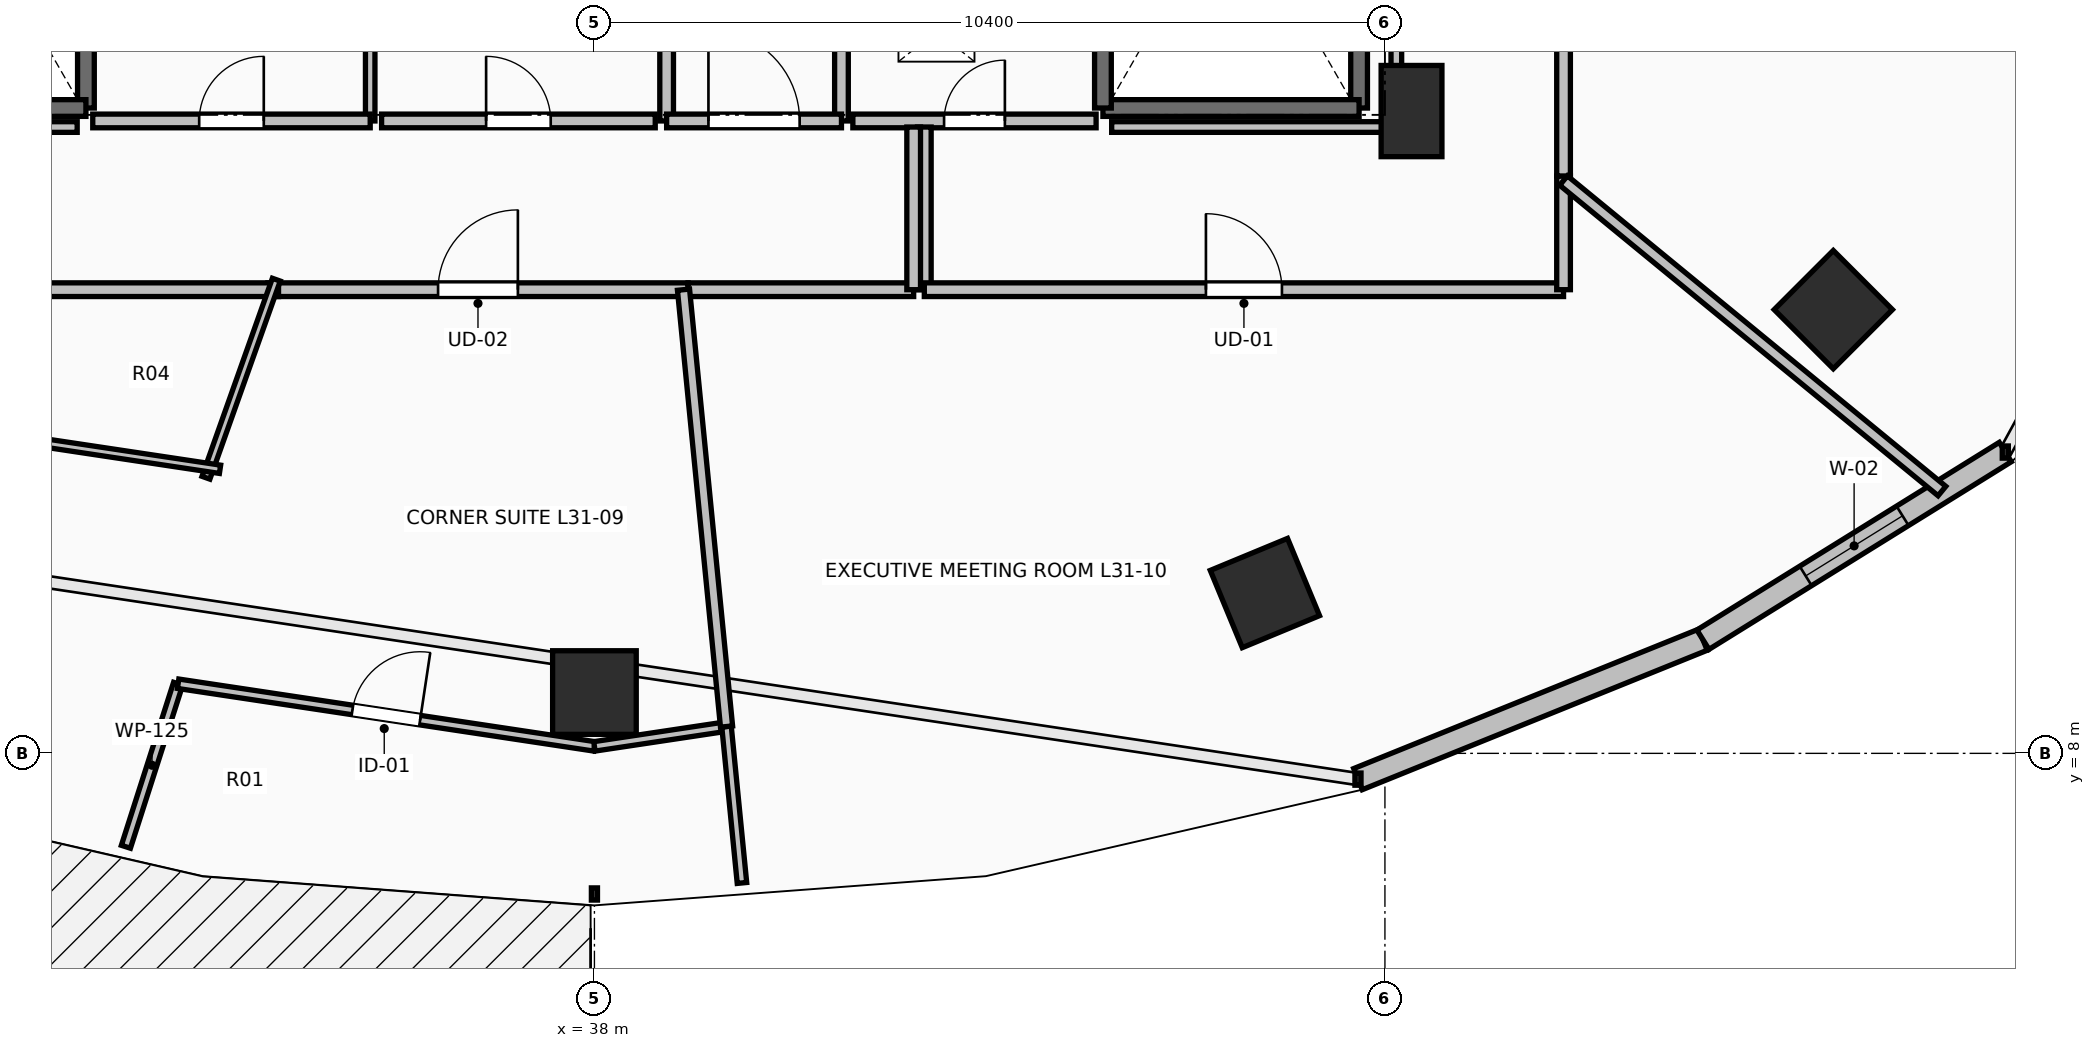
"""IFC4 building model, lengths in metres.
Left out: names, types, materials, properties, quantities, classifications, styles, units other than length and angle.
Written with IfcOpenShell. Run it as: python <this file> out.ifc"""

import sys

from ifc_helpers import new_model, si_unit, direction, frame, frame_2d, origin, origin_2d, place, context, subcontext, project, spatial, rectangle, extrude, element, fill, save


model = new_model("IFC4")
c1 = context("Model", 3, precision=1e-05, world=origin(), true_north=direction((0.0, 1.0)))
c2 = subcontext(c1, "Body", "Model", "MODEL_VIEW")
j1 = project(units=[si_unit("LENGTHUNIT", "METRE"), si_unit("PLANEANGLEUNIT", "RADIAN")], contexts=[c1])
p1 = place(None, origin())
s1 = spatial("IfcSite", under=j1, at=p1, CompositionType="ELEMENT")
p2 = place(p1, origin())
s2 = spatial("IfcBuilding", under=s1, at=p2, CompositionType="ELEMENT")
p3 = place(p2, frame((0.0, 0.0, 117.3)))
s3 = spatial("IfcBuildingStorey", under=s2, at=p3, CompositionType="ELEMENT", Elevation=117.3)
for number, where, z_axis, x_axis in (
    (1, (38.0, 8.8, 0.0), (0.0, 0.0, 1.0), (0.0, -1.0, 0.0)),
    (2, (46.821, 10.109, 0.0), (0.0, 0.0, 1.0), (0.383, -0.924, 0.0)),
    (3, (54.299, 13.838, 0.0), (0.0, 0.0, 1.0), (0.707, -0.707, 0.0)),
):
    element("IfcColumn", number, at=place(p3, frame(where, z_axis=z_axis, x_axis=x_axis)), inside=s3, PredefinedType="COLUMN", context=c2, shape_type="SweptSolid", body=[
        extrude(rectangle(XDim=1.1, YDim=1.1, at=origin_2d()), origin(), (0.0, 0.0, 1.0), 3.5),
    ])
p4 = place(p3, frame((48.75, 16.45, 0.0), z_axis=(0.0, 0.0, 1.0), x_axis=(1.0, 0.0, 0.0)))
e4 = element("IfcColumn", 4, at=p4, inside=s3, PredefinedType="PILASTER", context=c2, shape_type="SweptSolid", body=[
    extrude(rectangle(XDim=0.8, YDim=1.2, at=origin_2d()), origin(), (0.0, 0.0, 1.0), 3.5),
])
p5 = place(p3, frame((48.045, 7.661, 0.0), z_axis=(0.0, 0.0, 1.0), x_axis=(0.927122233109, 0.374759075775, 0.0)))
e5 = element("IfcWall", 5, at=p5, inside=s3, PredefinedType="STANDARD", context=c2, shape_type="SweptSolid", body=[
    extrude(rectangle(XDim=4.895, YDim=0.3, at=frame_2d((2.448, 0.0))), origin(), (0.0, 0.0, 1.0), 3.24),
])
p6 = place(p3, frame((52.584, 9.495, 0.0), z_axis=(0.0, 0.0, 1.0), x_axis=(0.849684479743, 0.527291461038, 0.0)))
e6 = element("IfcWall", 6, at=p6, inside=s3, PredefinedType="STANDARD", context=c2, shape_type="SweptSolid", body=[
    extrude(rectangle(XDim=4.681, YDim=0.3, at=frame_2d((2.341, 0.0))), origin(), (0.0, 0.0, 1.0), 3.24),
])
p7 = place(p6, frame((1.591, 0.0, 0.85)))
e7 = element("IfcOpeningElement", 7, at=p7, cuts=e6, PredefinedType="OPENING", context=c2, shape_type="SweptSolid", body=[
    extrude(rectangle(XDim=1.5, YDim=2.19, at=frame_2d((0.75, 1.095))), frame((0.0, 0.165, 0.0), z_axis=(0.0, -1.0, 0.0), x_axis=(1.0, 0.0, 0.0)), (0.0, 0.0, 1.0), 0.33),
])
p8 = place(p3, frame((31.31, 23.91, 0.0), z_axis=(0.0, 0.0, 1.0), x_axis=(0.0, -1.0, 0.0)))
e8 = element("IfcWall", 8, at=p8, inside=s3, PredefinedType="SOLIDWALL", context=c2, shape_type="SweptSolid", body=[
    extrude(rectangle(XDim=7.42, YDim=0.22, at=frame_2d((3.71, 0.0))), origin(), (0.0, 0.0, 1.0), 3.24),
])
p9 = place(p3, frame((31.31, 16.49, 0.0), z_axis=(0.0, 0.0, 1.0), x_axis=(-1.0, 0.0, 0.0)))
e9 = element("IfcWall", 9, at=p9, inside=s3, PredefinedType="SOLIDWALL", context=c2, shape_type="SweptSolid", body=[
    extrude(rectangle(XDim=3.37, YDim=0.22, at=frame_2d((1.685, 0.0))), origin(), (0.0, 0.0, 1.0), 3.24),
])
p10 = place(p3, frame((48.06, 23.91, 0.0), z_axis=(0.0, 0.0, 1.0), x_axis=(0.0, -1.0, 0.0)))
e10 = element("IfcWall", 10, at=p10, inside=s3, PredefinedType="SOLIDWALL", context=c2, shape_type="SweptSolid", body=[
    extrude(rectangle(XDim=7.42, YDim=0.22, at=frame_2d((3.71, 0.0))), origin(), (0.0, 0.0, 1.0), 3.24),
])
p11 = place(p3, frame((48.06, 16.49, 0.0), z_axis=(0.0, 0.0, 1.0), x_axis=(-1.0, 0.0, 0.0)))
e11 = element("IfcWall", 11, at=p11, inside=s3, PredefinedType="SOLIDWALL", context=c2, shape_type="SweptSolid", body=[
    extrude(rectangle(XDim=3.37, YDim=0.22, at=frame_2d((1.685, 0.0))), origin(), (0.0, 0.0, 1.0), 3.24),
])
p12 = place(p3, frame((44.69, 16.49, 0.0), z_axis=(0.0, 0.0, 1.0), x_axis=(0.0, 1.0, 0.0)))
e12 = element("IfcWall", 12, at=p12, inside=s3, PredefinedType="SOLIDWALL", context=c2, shape_type="SweptSolid", body=[
    extrude(rectangle(XDim=7.42, YDim=0.22, at=frame_2d((3.71, 0.0))), origin(), (0.0, 0.0, 1.0), 3.24),
])
p13 = place(p3, frame((41.25, 16.32, 0.0), z_axis=(0.0, 0.0, 1.0), x_axis=(0.0, 1.0, 0.0)))
e13 = element("IfcWall", 13, at=p13, inside=s3, PredefinedType="PARTITIONING", context=c2, shape_type="SweptSolid", body=[
    extrude(rectangle(XDim=7.88, YDim=0.18, at=frame_2d((3.94, 0.0))), origin(), (0.0, 0.0, 1.0), 3.24),
])
p14 = place(p13, frame((3.54, 0.0, 0.0)))
e14 = element("IfcOpeningElement", 14, at=p14, cuts=e13, PredefinedType="OPENING", context=c2, shape_type="SweptSolid", body=[
    extrude(rectangle(XDim=0.8, YDim=2.05, at=frame_2d((0.4, 1.025))), frame((0.0, 0.105, 0.0), z_axis=(0.0, -1.0, 0.0), x_axis=(1.0, 0.0, 0.0)), (0.0, 0.0, 1.0), 0.21),
])
p15 = place(p3, frame((38.95, 21.755, 0.0), z_axis=(0.0, 0.0, 1.0), x_axis=(0.0, -1.0, 0.0)))
e15 = element("IfcWall", 15, at=p15, inside=s3, PredefinedType="PARTITIONING", context=c2, shape_type="SweptSolid", body=[
    extrude(rectangle(XDim=5.435, YDim=0.18, at=frame_2d((2.717, 0.0))), origin(), (0.0, 0.0, 1.0), 3.24),
])
p16 = place(p15, frame((2.292, 0.0, 0.0)))
e16 = element("IfcOpeningElement", 16, at=p16, cuts=e15, PredefinedType="OPENING", context=c2, shape_type="SweptSolid", body=[
    extrude(rectangle(XDim=0.85, YDim=2.1, at=frame_2d((0.425, 1.05))), frame((0.0, 0.105, 0.0), z_axis=(0.0, -1.0, 0.0), x_axis=(1.0, 0.0, 0.0)), (0.0, 0.0, 1.0), 0.21),
])
p17 = place(p3, frame((38.95, 16.32, 0.0), z_axis=(0.0, 0.0, 1.0), x_axis=(1.0, 0.0, 0.0)))
e17 = element("IfcWall", 17, at=p17, inside=s3, PredefinedType="PARTITIONING", context=c2, shape_type="SweptSolid", body=[
    extrude(rectangle(XDim=2.3, YDim=0.18, at=frame_2d((1.15, 0.0))), origin(), (0.0, 0.0, 1.0), 3.24),
])
p18 = place(p17, frame((0.55, 0.0, 0.0)))
e18 = element("IfcOpeningElement", 18, at=p18, cuts=e17, PredefinedType="OPENING", context=c2, shape_type="SweptSolid", body=[
    extrude(rectangle(XDim=1.2, YDim=2.15, at=frame_2d((0.6, 1.075))), frame((0.0, 0.105, 0.0), z_axis=(0.0, -1.0, 0.0), x_axis=(1.0, 0.0, 0.0)), (0.0, 0.0, 1.0), 0.21),
])
p19 = place(p3, frame((41.4, 16.32, 0.0), z_axis=(0.0, 0.0, 1.0), x_axis=(1.0, 0.0, 0.0)))
e19 = element("IfcWall", 19, at=p19, inside=s3, PredefinedType="PARTITIONING", context=c2, shape_type="SweptSolid", body=[
    extrude(rectangle(XDim=3.2, YDim=0.18, at=frame_2d((1.6, 0.0))), origin(), (0.0, 0.0, 1.0), 3.24),
])
p20 = place(p19, frame((1.2, 0.0, 0.0)))
e20 = element("IfcOpeningElement", 20, at=p20, cuts=e19, PredefinedType="OPENING", context=c2, shape_type="SweptSolid", body=[
    extrude(rectangle(XDim=0.8, YDim=2.05, at=frame_2d((0.4, 1.025))), frame((0.0, 0.105, 0.0), z_axis=(0.0, -1.0, 0.0), x_axis=(1.0, 0.0, 0.0)), (0.0, 0.0, 1.0), 0.21),
])
p21 = place(p3, frame((35.05, 16.32, 0.0), z_axis=(0.0, 0.0, 1.0), x_axis=(0.0, 1.0, 0.0)))
e21 = element("IfcWall", 21, at=p21, inside=s3, PredefinedType="PARTITIONING", context=c2, shape_type="SweptSolid", body=[
    extrude(rectangle(XDim=5.13, YDim=0.125, at=frame_2d((2.565, 0.0))), origin(), (0.0, 0.0, 1.0), 3.24),
])
p22 = place(p3, frame((31.4, 16.32, 0.0), z_axis=(0.0, 0.0, 1.0), x_axis=(1.0, 0.0, 0.0)))
e22 = element("IfcWall", 22, at=p22, inside=s3, PredefinedType="PARTITIONING", context=c2, shape_type="SweptSolid", body=[
    extrude(rectangle(XDim=3.65, YDim=0.18, at=frame_2d((1.825, 0.0))), origin(), (0.0, 0.0, 1.0), 3.24),
])
p23 = place(p22, frame((1.4, 0.0, 0.0)))
e23 = element("IfcOpeningElement", 23, at=p23, cuts=e22, PredefinedType="OPENING", context=c2, shape_type="SweptSolid", body=[
    extrude(rectangle(XDim=0.85, YDim=2.1, at=frame_2d((0.425, 1.05))), frame((0.0, 0.105, 0.0), z_axis=(0.0, -1.0, 0.0), x_axis=(1.0, 0.0, 0.0)), (0.0, 0.0, 1.0), 0.21),
])
p24 = place(p3, frame((35.2, 16.32, 0.0), z_axis=(0.0, 0.0, 1.0), x_axis=(1.0, 0.0, 0.0)))
e24 = element("IfcWall", 24, at=p24, inside=s3, PredefinedType="PARTITIONING", context=c2, shape_type="SweptSolid", body=[
    extrude(rectangle(XDim=3.6, YDim=0.18, at=frame_2d((1.8, 0.0))), origin(), (0.0, 0.0, 1.0), 3.24),
])
p25 = place(p24, frame((1.375, 0.0, 0.0)))
e25 = element("IfcOpeningElement", 25, at=p25, cuts=e24, PredefinedType="OPENING", context=c2, shape_type="SweptSolid", body=[
    extrude(rectangle(XDim=0.85, YDim=2.1, at=frame_2d((0.425, 1.05))), frame((0.0, 0.105, 0.0), z_axis=(0.0, -1.0, 0.0), x_axis=(1.0, 0.0, 0.0)), (0.0, 0.0, 1.0), 0.21),
])
p26 = place(p3, frame((33.704, 14.1, 0.0), z_axis=(0.0, 0.0, 1.0), x_axis=(1.0, 0.0, 0.0)))
e26 = element("IfcWall", 26, at=p26, inside=s3, PredefinedType="PARTITIONING", context=c2, shape_type="SweptSolid", body=[
    extrude(rectangle(XDim=5.528, YDim=0.18, at=frame_2d((2.764, 0.0))), origin(), (0.0, 0.0, 1.0), 2.874),
])
p27 = place(p26, frame((2.239, 0.0, 0.0)))
e27 = element("IfcOpeningElement", 27, at=p27, cuts=e26, PredefinedType="OPENING", context=c2, shape_type="SweptSolid", body=[
    extrude(rectangle(XDim=1.05, YDim=2.2, at=frame_2d((0.525, 1.1))), frame((0.0, 0.105, 0.0), z_axis=(0.0, -1.0, 0.0), x_axis=(1.0, 0.0, 0.0)), (0.0, 0.0, 1.0), 0.21),
])
p28 = place(p3, frame((28.154, 14.1, 0.0), z_axis=(0.0, 0.0, 1.0), x_axis=(1.0, 0.0, 0.0)))
e28 = element("IfcWall", 28, at=p28, inside=s3, PredefinedType="PARTITIONING", context=c2, shape_type="SweptSolid", body=[
    extrude(rectangle(XDim=5.69, YDim=0.18, at=frame_2d((2.845, 0.0))), origin(), (0.0, 0.0, 1.0), 2.432),
])
p29 = place(p3, frame((42.34, 16.24, 0.0), z_axis=(0.0, 0.0, 1.0), x_axis=(0.0, -1.0, 0.0)))
e29 = element("IfcWall", 29, at=p29, inside=s3, PredefinedType="PARTITIONING", context=c2, shape_type="SweptSolid", body=[
    extrude(rectangle(XDim=2.14, YDim=0.18, at=frame_2d((1.07, 0.0))), origin(), (0.0, 0.0, 1.0), 2.874),
])
p30 = place(p3, frame((42.34, 14.1, 0.0), z_axis=(0.0, 0.0, 1.0), x_axis=(1.0, 0.0, 0.0)))
e30 = element("IfcWall", 30, at=p30, inside=s3, PredefinedType="PARTITIONING", context=c2, shape_type="SweptSolid", body=[
    extrude(rectangle(XDim=8.41, YDim=0.18, at=frame_2d((4.205, 0.0))), origin(), (0.0, 0.0, 1.0), 2.432),
])
p31 = place(p30, frame((3.705, 0.0, 0.0)))
e31 = element("IfcOpeningElement", 31, at=p31, cuts=e30, PredefinedType="OPENING", context=c2, shape_type="SweptSolid", body=[
    extrude(rectangle(XDim=1.0, YDim=2.15, at=frame_2d((0.5, 1.075))), frame((0.0, 0.105, 0.0), z_axis=(0.0, -1.0, 0.0), x_axis=(1.0, 0.0, 0.0)), (0.0, 0.0, 1.0), 0.21),
])
p32 = place(p3, frame((50.75, 14.1, 0.0), z_axis=(0.0, 0.0, 1.0), x_axis=(0.0, 1.0, 0.0)))
e32 = element("IfcWall", 32, at=p32, inside=s3, PredefinedType="PARTITIONING", context=c2, shape_type="SweptSolid", body=[
    extrude(rectangle(XDim=1.496, YDim=0.18, at=frame_2d((0.748, 0.0))), origin(), (0.0, 0.0, 1.0), 2.432),
])
p33 = place(p3, frame((39.232, 14.1, 0.0), z_axis=(0.0, 0.0, 1.0), x_axis=(1.0, 0.0, 0.0)))
e33 = element("IfcWall", 33, at=p33, inside=s3, PredefinedType="PARTITIONING", context=c2, shape_type="SweptSolid", body=[
    extrude(rectangle(XDim=2.968, YDim=0.18, at=frame_2d((1.484, 0.0))), origin(), (0.0, 0.0, 1.0), 2.874),
])
p34 = place(p3, frame((42.2, 14.1, 0.0), z_axis=(0.0, 0.0, 1.0), x_axis=(0.0, 1.0, 0.0)))
e34 = element("IfcWall", 34, at=p34, inside=s3, PredefinedType="PARTITIONING", context=c2, shape_type="SweptSolid", body=[
    extrude(rectangle(XDim=2.14, YDim=0.18, at=frame_2d((1.07, 0.0))), origin(), (0.0, 0.0, 1.0), 2.874),
])
p35 = place(p3, frame((50.75, 15.596, 0.0), z_axis=(0.0, 0.0, 1.0), x_axis=(0.0, 1.0, 0.0)))
e35 = element("IfcWall", 35, at=p35, inside=s3, PredefinedType="PARTITIONING", context=c2, shape_type="SweptSolid", body=[
    extrude(rectangle(XDim=11.46, YDim=0.18, at=frame_2d((5.73, 0.0))), origin(), (0.0, 0.0, 1.0), 2.432),
])
p36 = place(p35, frame((5.23, 0.0, 0.0)))
e36 = element("IfcOpeningElement", 36, at=p36, cuts=e35, PredefinedType="OPENING", context=c2, shape_type="SweptSolid", body=[
    extrude(rectangle(XDim=1.0, YDim=2.15, at=frame_2d((0.5, 1.075))), frame((0.0, 0.105, 0.0), z_axis=(0.0, -1.0, 0.0), x_axis=(1.0, 0.0, 0.0)), (0.0, 0.0, 1.0), 0.21),
])
p37 = place(p3, frame((33.815, 14.232, 0.0), z_axis=(0.0, 0.0, 1.0), x_axis=(-0.334786713612, -0.942293933117, 0.0)))
e37 = element("IfcWall", 37, at=p37, inside=s3, PredefinedType="PARTITIONING", context=c2, shape_type="SweptSolid", body=[
    extrude(rectangle(XDim=2.765, YDim=0.11, at=frame_2d((1.383, 0.0))), origin(), (0.0, 0.0, 1.0), 2.874),
])
p38 = place(p3, frame((33.074, 11.737, 0.0), z_axis=(0.0, 0.0, 1.0), x_axis=(-0.988902866222, 0.148563525729, 0.0)))
e38 = element("IfcWall", 38, at=p38, inside=s3, PredefinedType="PARTITIONING", context=c2, shape_type="SweptSolid", body=[
    extrude(rectangle(XDim=2.836, YDim=0.11, at=frame_2d((1.418, 0.0))), origin(), (0.0, 0.0, 1.0), 3.24),
])
p39 = place(p3, frame((31.836, 6.771, 0.0), z_axis=(0.0, 0.0, 1.0), x_axis=(0.305019563363, 0.952346085184, 0.0)))
e39 = element("IfcWall", 39, at=p39, inside=s3, PredefinedType="PARTITIONING", context=c2, shape_type="SweptSolid", body=[
    extrude(rectangle(XDim=2.252, YDim=0.125, at=frame_2d((1.126, 0.0))), origin(), (0.0, 0.0, 1.0), 3.24),
])
p40 = place(p3, frame((32.523, 8.916, 0.0), z_axis=(0.0, 0.0, 1.0), x_axis=(0.988872243588, -0.148767220385, 0.0)))
e40 = element("IfcWall", 40, at=p40, inside=s3, PredefinedType="PARTITIONING", context=c2, shape_type="SweptSolid", body=[
    extrude(rectangle(XDim=5.539, YDim=0.125, at=frame_2d((2.769, 0.0))), origin(), (0.0, 0.0, 1.0), 3.24),
])
p41 = place(p40, frame((2.319, 0.0, 0.0)))
e41 = element("IfcOpeningElement", 41, at=p41, cuts=e40, PredefinedType="OPENING", context=c2, shape_type="SweptSolid", body=[
    extrude(rectangle(XDim=0.9, YDim=2.1, at=frame_2d((0.45, 1.05))), frame((0.0, 0.077, 0.0), z_axis=(0.0, -1.0, 0.0), x_axis=(1.0, 0.0, 0.0)), (0.0, 0.0, 1.0), 0.155),
])
p42 = place(p3, frame((38.0, 8.092, 0.0), z_axis=(0.0, 0.0, 1.0), x_axis=(0.988912905534, 0.148496684368, 0.0)))
e42 = element("IfcWall", 42, at=p42, inside=s3, PredefinedType="PARTITIONING", context=c2, shape_type="SweptSolid", body=[
    extrude(rectangle(XDim=1.758, YDim=0.125, at=frame_2d((0.879, 0.0))), origin(), (0.0, 0.0, 1.0), 3.24),
])
p43 = place(p3, frame((39.738, 8.353, 0.0), z_axis=(0.0, 0.0, 1.0), x_axis=(0.098101024823, -0.995176461201, 0.0)))
e43 = element("IfcWall", 43, at=p43, inside=s3, PredefinedType="PARTITIONING", context=c2, shape_type="SweptSolid", body=[
    extrude(rectangle(XDim=2.068, YDim=0.125, at=frame_2d((1.034, 0.0))), origin(), (0.0, 0.0, 1.0), 3.24),
])
p44 = place(p3, frame((39.738, 8.353, 0.0), z_axis=(0.0, 0.0, 1.0), x_axis=(-0.098038593066, 0.995182613529, 0.0)))
e44 = element("IfcWall", 44, at=p44, inside=s3, PredefinedType="PARTITIONING", context=c2, shape_type="SweptSolid", body=[
    extrude(rectangle(XDim=5.775, YDim=0.16, at=frame_2d((2.887, 0.0))), origin(), (0.0, 0.0, 1.0), 2.432),
])
p45 = place(p3, frame((55.728, 11.451, 0.0), z_axis=(0.0, 0.0, 1.0), x_axis=(-0.7730409537, 0.634356117573, 0.0)))
e45 = element("IfcWall", 45, at=p45, inside=s3, PredefinedType="PARTITIONING", context=c2, shape_type="SweptSolid", body=[
    extrude(rectangle(XDim=6.439, YDim=0.16, at=frame_2d((3.22, 0.0))), origin(), (0.0, 0.0, 1.0), 2.432),
])
p46 = place(p3, frame((48.55, 23.754, 0.0), z_axis=(0.0, 0.0, 1.0), x_axis=(0.0, -1.0, 0.0)))
e46 = element("IfcWall", 46, at=p46, inside=s3, PredefinedType="PARTITIONING", context=c2, shape_type="SweptSolid", body=[
    extrude(rectangle(XDim=7.514, YDim=0.14, at=frame_2d((3.757, 0.0))), origin(), (0.0, 0.0, 1.0), 2.432),
])
for number, where, z_axis, x_axis in (
    (47, (48.55, 16.24, 0.0), (0.0, 0.0, 1.0), (-1.0, 0.0, 0.0)),
    (48, (31.195, 16.24, 0.0), (0.0, 0.0, 1.0), (-1.0, 0.0, 0.0)),
):
    element("IfcWall", number, at=place(p3, frame(where, z_axis=z_axis, x_axis=x_axis)), inside=s3, PredefinedType="PARTITIONING", context=c2, shape_type="SweptSolid", body=[
        extrude(rectangle(XDim=3.745, YDim=0.14, at=frame_2d((1.873, 0.0))), origin(), (0.0, 0.0, 1.0), 2.432),
    ])
p47 = place(p7, origin())
e49 = element("IfcWindow", 49, at=p47, inside=s3, PartitioningType="SINGLE_PANEL", PredefinedType="WINDOW", context=c2, shape_type="SweptSolid", body=[
    extrude(rectangle(XDim=1.5, YDim=2.19, at=frame_2d((0.75, 1.095))), frame((0.0, 0.03, 0.0), z_axis=(0.0, -1.0, 0.0), x_axis=(1.0, 0.0, 0.0)), (0.0, 0.0, 1.0), 0.06),
])
fill(e7, e49)
p48 = place(p18, origin())
e50 = element("IfcDoor", 50, at=p48, inside=s3, OperationType="SINGLE_SWING_LEFT", PredefinedType="DOOR", context=c2, shape_type="SweptSolid", body=[
    extrude(rectangle(XDim=1.2, YDim=2.15, at=frame_2d((0.6, 1.075))), frame((0.0, 0.025, 0.0), z_axis=(0.0, -1.0, 0.0), x_axis=(1.0, 0.0, 0.0)), (0.0, 0.0, 1.0), 0.05),
])
fill(e18, e50)
p49 = place(p20, origin())
e51 = element("IfcDoor", 51, at=p49, inside=s3, OperationType="SINGLE_SWING_RIGHT", PredefinedType="DOOR", context=c2, shape_type="SweptSolid", body=[
    extrude(rectangle(XDim=0.8, YDim=2.05, at=frame_2d((0.4, 1.025))), frame((0.0, 0.025, 0.0), z_axis=(0.0, -1.0, 0.0), x_axis=(1.0, 0.0, 0.0)), (0.0, 0.0, 1.0), 0.05),
])
fill(e20, e51)
p50 = place(p23, origin())
e52 = element("IfcDoor", 52, at=p50, inside=s3, OperationType="SINGLE_SWING_RIGHT", PredefinedType="DOOR", context=c2, shape_type="SweptSolid", body=[
    extrude(rectangle(XDim=0.85, YDim=2.1, at=frame_2d((0.425, 1.05))), frame((0.0, 0.025, 0.0), z_axis=(0.0, -1.0, 0.0), x_axis=(1.0, 0.0, 0.0)), (0.0, 0.0, 1.0), 0.05),
])
fill(e23, e52)
p51 = place(p25, origin())
e53 = element("IfcDoor", 53, at=p51, inside=s3, OperationType="SINGLE_SWING_LEFT", PredefinedType="DOOR", context=c2, shape_type="SweptSolid", body=[
    extrude(rectangle(XDim=0.85, YDim=2.1, at=frame_2d((0.425, 1.05))), frame((0.0, 0.025, 0.0), z_axis=(0.0, -1.0, 0.0), x_axis=(1.0, 0.0, 0.0)), (0.0, 0.0, 1.0), 0.05),
])
fill(e25, e53)
p52 = place(p27, origin())
e54 = element("IfcDoor", 54, at=p52, inside=s3, OperationType="SINGLE_SWING_RIGHT", PredefinedType="DOOR", context=c2, shape_type="SweptSolid", body=[
    extrude(rectangle(XDim=1.05, YDim=2.2, at=frame_2d((0.525, 1.1))), frame((0.0, 0.025, 0.0), z_axis=(0.0, -1.0, 0.0), x_axis=(1.0, 0.0, 0.0)), (0.0, 0.0, 1.0), 0.05),
])
fill(e27, e54)
p53 = place(p31, origin())
e55 = element("IfcDoor", 55, at=p53, inside=s3, OperationType="SINGLE_SWING_LEFT", PredefinedType="DOOR", context=c2, shape_type="SweptSolid", body=[
    extrude(rectangle(XDim=1.0, YDim=2.15, at=frame_2d((0.5, 1.075))), frame((0.0, 0.025, 0.0), z_axis=(0.0, -1.0, 0.0), x_axis=(1.0, 0.0, 0.0)), (0.0, 0.0, 1.0), 0.05),
])
fill(e31, e55)
p54 = place(p41, origin())
e56 = element("IfcDoor", 56, at=p54, inside=s3, OperationType="SINGLE_SWING_RIGHT", PredefinedType="DOOR", context=c2, shape_type="SweptSolid", body=[
    extrude(rectangle(XDim=0.9, YDim=2.1, at=frame_2d((0.45, 1.05))), frame((0.0, 0.025, 0.0), z_axis=(0.0, -1.0, 0.0), x_axis=(1.0, 0.0, 0.0)), (0.0, 0.0, 1.0), 0.05),
])
fill(e41, e56)
save(model, sys.argv[1])
